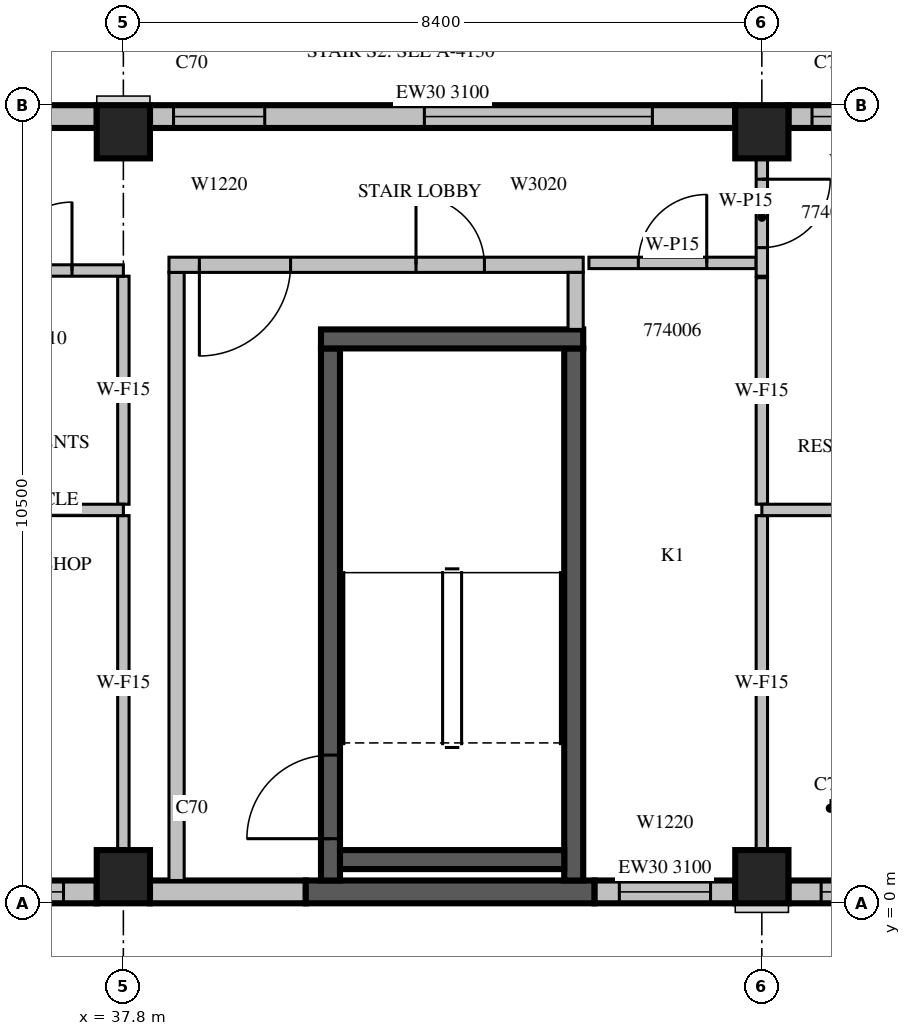
"""IFC4 building model, lengths in metres.
Left out: names, types, materials, properties, quantities, classifications, styles, units other than length and angle.
Written with IfcOpenShell. Run it as: python <this file> out.ifc"""

import sys

from ifc_helpers import new_model, si_unit, direction, frame, frame_2d, origin, origin_2d, place, context, subcontext, project, spatial, rectangle, extrude, source, transform, mapped, element, fill, save


model = new_model("IFC4")
c1 = context("Model", 3, precision=1e-05, world=origin(), true_north=direction((0.0, 1.0)))
c2 = subcontext(c1, "Body", "Model", "MODEL_VIEW")
j1 = project(units=[si_unit("LENGTHUNIT", "METRE"), si_unit("PLANEANGLEUNIT", "RADIAN")], contexts=[c1])
p1 = place(None, origin())
s1 = spatial("IfcSite", under=j1, at=p1, CompositionType="ELEMENT")
p2 = place(p1, origin())
s2 = spatial("IfcBuilding", under=s1, at=p2, CompositionType="ELEMENT")
p3 = place(p2, frame((0.0, 0.0, 319.5)))
s3 = spatial("IfcBuildingStorey", under=s2, at=p3, CompositionType="ELEMENT", Elevation=319.5)
m1 = source(origin(), c2, "Body", "SweptSolid", [
    extrude(rectangle(XDim=0.7, YDim=0.7, at=origin_2d()), origin(), (0.0, 0.0, 1.0), 3.5),
])
for number, where, z_axis, x_axis in (
    (1, (37.8, 0.35, 0.0), (0.0, 0.0, 1.0), (1.0, 0.0, 0.0)),
    (2, (46.2, 0.35, 0.0), (0.0, 0.0, 1.0), (1.0, 0.0, 0.0)),
    (3, (37.8, 10.15, 0.0), (0.0, 0.0, 1.0), (1.0, 0.0, 0.0)),
    (4, (46.2, 10.15, 0.0), (0.0, 0.0, 1.0), (1.0, 0.0, 0.0)),
):
    element("IfcColumn", number, at=place(p3, frame(where, z_axis=z_axis, x_axis=x_axis)), inside=s3, PredefinedType="COLUMN", context=c2, shape_type="MappedRepresentation", body=[
        mapped(m1, transform((0.0, 0.0, 0.0), scale=1.0)),
    ])
m2 = source(origin(), c2, "Body", "SweptSolid", [
    extrude(rectangle(XDim=7.7, YDim=0.3, at=frame_2d((3.85, 0.0))), origin(), (0.0, 0.0, 1.0), 3.1),
])
p4 = place(p3, frame((29.75, 0.15, 0.0), z_axis=(0.0, 0.0, 1.0), x_axis=(1.0, 0.0, 0.0)))
e5 = element("IfcWall", 5, at=p4, inside=s3, PredefinedType="STANDARD", context=c2, shape_type="MappedRepresentation", body=[
    mapped(m2, transform((0.0, 0.0, 0.0), scale=1.0)),
])
m3 = source(origin(), c2, "Body", "SweptSolid", [
    extrude(rectangle(XDim=1.2, YDim=2.0, at=frame_2d((0.6, 1.0))), frame((0.0, 0.16, 0.0), z_axis=(0.0, -1.0, 0.0), x_axis=(1.0, 0.0, 0.0)), (0.0, 0.0, 1.0), 0.32),
])
p5 = place(p4, frame((0.537, 0.0, 0.6)))
e6 = element("IfcOpeningElement", 6, at=p5, cuts=e5, PredefinedType="OPENING", context=c2, shape_type="MappedRepresentation", body=[
    mapped(m3, transform((0.0, 0.0, 0.0), scale=1.0)),
])
p6 = place(p4, frame((6.062, 0.0, 0.6)))
e7 = element("IfcOpeningElement", 7, at=p6, cuts=e5, PredefinedType="OPENING", context=c2, shape_type="MappedRepresentation", body=[
    mapped(m3, transform((0.0, 0.0, 0.0), scale=1.0)),
])
m4 = source(origin(), c2, "Body", "SweptSolid", [
    extrude(rectangle(XDim=2.4, YDim=2.0, at=frame_2d((1.2, 1.0))), frame((0.0, 0.16, 0.0), z_axis=(0.0, -1.0, 0.0), x_axis=(1.0, 0.0, 0.0)), (0.0, 0.0, 1.0), 0.32),
])
p7 = place(p4, frame((2.7, 0.0, 0.6)))
e8 = element("IfcOpeningElement", 8, at=p7, cuts=e5, PredefinedType="OPENING", context=c2, shape_type="MappedRepresentation", body=[
    mapped(m4, transform((0.0, 0.0, 0.0), scale=1.0)),
])
m5 = source(origin(), c2, "Body", "SweptSolid", [
    extrude(rectangle(XDim=2.05, YDim=0.3, at=frame_2d((1.025, 0.0))), origin(), (0.0, 0.0, 1.0), 3.1),
])
p8 = place(p3, frame((38.15, 0.15, 0.0), z_axis=(0.0, 0.0, 1.0), x_axis=(1.0, 0.0, 0.0)))
e9 = element("IfcWall", 9, at=p8, inside=s3, PredefinedType="STANDARD", context=c2, shape_type="MappedRepresentation", body=[
    mapped(m5, transform((0.0, 0.0, 0.0), scale=1.0)),
])
m6 = source(origin(), c2, "Body", "SweptSolid", [
    extrude(rectangle(XDim=3.8, YDim=0.3, at=frame_2d((1.9, 0.0))), origin(), (0.0, 0.0, 1.0), 3.1),
])
p9 = place(p3, frame((40.2, 0.15, 0.0), z_axis=(0.0, 0.0, 1.0), x_axis=(1.0, 0.0, 0.0)))
e10 = element("IfcWall", 10, at=p9, inside=s3, PredefinedType="SOLIDWALL", context=c2, shape_type="MappedRepresentation", body=[
    mapped(m6, transform((0.0, 0.0, 0.0), scale=1.0)),
])
m7 = source(origin(), c2, "Body", "SweptSolid", [
    extrude(rectangle(XDim=1.85, YDim=0.3, at=frame_2d((0.925, 0.0))), origin(), (0.0, 0.0, 1.0), 3.1),
])
p10 = place(p3, frame((44.0, 0.15, 0.0), z_axis=(0.0, 0.0, 1.0), x_axis=(1.0, 0.0, 0.0)))
e11 = element("IfcWall", 11, at=p10, inside=s3, PredefinedType="STANDARD", context=c2, shape_type="MappedRepresentation", body=[
    mapped(m7, transform((0.0, 0.0, 0.0), scale=1.0)),
])
p11 = place(p10, frame((0.325, 0.0, 0.6)))
e12 = element("IfcOpeningElement", 12, at=p11, cuts=e11, PredefinedType="OPENING", context=c2, shape_type="MappedRepresentation", body=[
    mapped(m3, transform((0.0, 0.0, 0.0), scale=1.0)),
])
m8 = source(origin(), c2, "Body", "SweptSolid", [
    extrude(rectangle(XDim=3.01, YDim=0.3, at=frame_2d((1.505, 0.0))), origin(), (0.0, 0.0, 1.0), 3.1),
])
p12 = place(p3, frame((46.55, 0.15, 0.0), z_axis=(0.0, 0.0, 1.0), x_axis=(1.0, 0.0, 0.0)))
e13 = element("IfcWall", 13, at=p12, inside=s3, PredefinedType="STANDARD", context=c2, shape_type="MappedRepresentation", body=[
    mapped(m8, transform((0.0, 0.0, 0.0), scale=1.0)),
])
m9 = source(origin(), c2, "Body", "SweptSolid", [
    extrude(rectangle(XDim=1.8, YDim=2.0, at=frame_2d((0.9, 1.0))), frame((0.0, 0.16, 0.0), z_axis=(0.0, -1.0, 0.0), x_axis=(1.0, 0.0, 0.0)), (0.0, 0.0, 1.0), 0.32),
])
p13 = place(p12, frame((0.43, 0.0, 0.6)))
e14 = element("IfcOpeningElement", 14, at=p13, cuts=e13, PredefinedType="OPENING", context=c2, shape_type="MappedRepresentation", body=[
    mapped(m9, transform((0.0, 0.0, 0.0), scale=1.0)),
])
p14 = place(p3, frame((49.56, 10.35, 0.0), z_axis=(0.0, 0.0, 1.0), x_axis=(-1.0, 0.0, 0.0)))
e15 = element("IfcWall", 15, at=p14, inside=s3, PredefinedType="STANDARD", context=c2, shape_type="MappedRepresentation", body=[
    mapped(m8, transform((0.0, 0.0, 0.0), scale=1.0)),
])
p15 = place(p14, frame((1.5, 0.0, 0.6)))
e16 = element("IfcOpeningElement", 16, at=p15, cuts=e15, PredefinedType="OPENING", context=c2, shape_type="MappedRepresentation", body=[
    mapped(m3, transform((0.0, 0.0, 0.0), scale=1.0)),
])
p16 = place(p3, frame((45.85, 10.35, 0.0), z_axis=(0.0, 0.0, 1.0), x_axis=(-1.0, 0.0, 0.0)))
e17 = element("IfcWall", 17, at=p16, inside=s3, PredefinedType="STANDARD", context=c2, shape_type="MappedRepresentation", body=[
    mapped(m2, transform((0.0, 0.0, 0.0), scale=1.0)),
])
m10 = source(origin(), c2, "Body", "SweptSolid", [
    extrude(rectangle(XDim=3.0, YDim=2.0, at=frame_2d((1.5, 1.0))), frame((0.0, 0.16, 0.0), z_axis=(0.0, -1.0, 0.0), x_axis=(1.0, 0.0, 0.0)), (0.0, 0.0, 1.0), 0.32),
])
p17 = place(p16, frame((1.09, 0.0, 0.6)))
e18 = element("IfcOpeningElement", 18, at=p17, cuts=e17, PredefinedType="OPENING", context=c2, shape_type="MappedRepresentation", body=[
    mapped(m10, transform((0.0, 0.0, 0.0), scale=1.0)),
])
p18 = place(p16, frame((6.19, 0.0, 0.6)))
e19 = element("IfcOpeningElement", 19, at=p18, cuts=e17, PredefinedType="OPENING", context=c2, shape_type="MappedRepresentation", body=[
    mapped(m3, transform((0.0, 0.0, 0.0), scale=1.0)),
])
p19 = place(p3, frame((37.45, 10.35, 0.0), z_axis=(0.0, 0.0, 1.0), x_axis=(-1.0, 0.0, 0.0)))
e20 = element("IfcWall", 20, at=p19, inside=s3, PredefinedType="STANDARD", context=c2, shape_type="MappedRepresentation", body=[
    mapped(m2, transform((0.0, 0.0, 0.0), scale=1.0)),
])
p20 = place(p19, frame((1.09, 0.0, 0.6)))
e21 = element("IfcOpeningElement", 21, at=p20, cuts=e20, PredefinedType="OPENING", context=c2, shape_type="MappedRepresentation", body=[
    mapped(m10, transform((0.0, 0.0, 0.0), scale=1.0)),
])
p21 = place(p19, frame((6.19, 0.0, 0.6)))
e22 = element("IfcOpeningElement", 22, at=p21, cuts=e20, PredefinedType="OPENING", context=c2, shape_type="MappedRepresentation", body=[
    mapped(m3, transform((0.0, 0.0, 0.0), scale=1.0)),
])
m11 = source(origin(), c2, "Body", "SweptSolid", [
    extrude(rectangle(XDim=7.0, YDim=0.25, at=frame_2d((3.5, 0.0))), origin(), (0.0, 0.0, 1.0), 3.1),
])
p22 = place(p3, frame((40.525, 0.3, 0.0), z_axis=(0.0, 0.0, 1.0), x_axis=(0.0, 1.0, 0.0)))
e23 = element("IfcWall", 23, at=p22, inside=s3, PredefinedType="SOLIDWALL", context=c2, shape_type="MappedRepresentation", body=[
    mapped(m11, transform((0.0, 0.0, 0.0), scale=1.0)),
])
m12 = source(origin(), c2, "Body", "SweptSolid", [
    extrude(rectangle(XDim=1.1, YDim=2.1, at=frame_2d((0.55, 1.05))), frame((0.0, 0.135, 0.0), z_axis=(0.0, -1.0, 0.0), x_axis=(1.0, 0.0, 0.0)), (0.0, 0.0, 1.0), 0.27),
])
p23 = place(p22, frame((0.55, 0.0, 0.0)))
e24 = element("IfcOpeningElement", 24, at=p23, cuts=e23, PredefinedType="OPENING", context=c2, shape_type="MappedRepresentation", body=[
    mapped(m12, transform((0.0, 0.0, 0.0), scale=1.0)),
])
p24 = place(p3, frame((43.725, 0.3, 0.0), z_axis=(0.0, 0.0, 1.0), x_axis=(0.0, 1.0, 0.0)))
e25 = element("IfcWall", 25, at=p24, inside=s3, PredefinedType="SOLIDWALL", context=c2, shape_type="MappedRepresentation", body=[
    mapped(m11, transform((0.0, 0.0, 0.0), scale=1.0)),
])
m13 = source(origin(), c2, "Body", "SweptSolid", [
    extrude(rectangle(XDim=3.45, YDim=0.25, at=frame_2d((1.725, 0.0))), origin(), (0.0, 0.0, 1.0), 3.1),
])
p25 = place(p3, frame((40.4, 7.425, 0.0), z_axis=(0.0, 0.0, 1.0), x_axis=(1.0, 0.0, 0.0)))
e26 = element("IfcWall", 26, at=p25, inside=s3, PredefinedType="SOLIDWALL", context=c2, shape_type="MappedRepresentation", body=[
    mapped(m13, transform((0.0, 0.0, 0.0), scale=1.0)),
])
m14 = source(origin(), c2, "Body", "SweptSolid", [
    extrude(rectangle(XDim=2.95, YDim=0.25, at=frame_2d((1.475, 0.0))), origin(), (0.0, 0.0, 1.0), 3.1),
])
p26 = place(p3, frame((40.65, 0.575, 0.0), z_axis=(0.0, 0.0, 1.0), x_axis=(1.0, 0.0, 0.0)))
e27 = element("IfcWall", 27, at=p26, inside=s3, PredefinedType="SOLIDWALL", context=c2, shape_type="MappedRepresentation", body=[
    mapped(m14, transform((0.0, 0.0, 0.0), scale=1.0)),
])
m15 = source(origin(), c2, "Body", "SweptSolid", [
    extrude(rectangle(XDim=8.0, YDim=0.2, at=frame_2d((4.0, 0.0))), origin(), (0.0, 0.0, 1.0), 3.1),
])
p27 = place(p3, frame((38.5, 0.3, 0.0), z_axis=(0.0, 0.0, 1.0), x_axis=(0.0, 1.0, 0.0)))
e28 = element("IfcWall", 28, at=p27, inside=s3, PredefinedType="PARTITIONING", context=c2, shape_type="MappedRepresentation", body=[
    mapped(m15, transform((0.0, 0.0, 0.0), scale=1.0)),
])
m16 = source(origin(), c2, "Body", "SweptSolid", [
    extrude(rectangle(XDim=5.45, YDim=0.2, at=frame_2d((2.725, 0.0))), origin(), (0.0, 0.0, 1.0), 3.1),
])
p28 = place(p3, frame((38.4, 8.4, 0.0), z_axis=(0.0, 0.0, 1.0), x_axis=(1.0, 0.0, 0.0)))
e29 = element("IfcWall", 29, at=p28, inside=s3, PredefinedType="PARTITIONING", context=c2, shape_type="MappedRepresentation", body=[
    mapped(m16, transform((0.0, 0.0, 0.0), scale=1.0)),
])
m17 = source(origin(), c2, "Body", "SweptSolid", [
    extrude(rectangle(XDim=1.2, YDim=2.1, at=frame_2d((0.6, 1.05))), frame((0.0, 0.11, 0.0), z_axis=(0.0, -1.0, 0.0), x_axis=(1.0, 0.0, 0.0)), (0.0, 0.0, 1.0), 0.22),
])
p29 = place(p28, frame((0.4, 0.0, 0.0)))
e30 = element("IfcOpeningElement", 30, at=p29, cuts=e29, PredefinedType="OPENING", context=c2, shape_type="MappedRepresentation", body=[
    mapped(m17, transform((0.0, 0.0, 0.0), scale=1.0)),
])
m18 = source(origin(), c2, "Body", "SweptSolid", [
    extrude(rectangle(XDim=0.9, YDim=2.1, at=frame_2d((0.45, 1.05))), frame((0.0, 0.11, 0.0), z_axis=(0.0, -1.0, 0.0), x_axis=(1.0, 0.0, 0.0)), (0.0, 0.0, 1.0), 0.22),
])
p30 = place(p28, frame((3.25, 0.0, 0.0)))
e31 = element("IfcOpeningElement", 31, at=p30, cuts=e29, PredefinedType="OPENING", context=c2, shape_type="MappedRepresentation", body=[
    mapped(m18, transform((0.0, 0.0, 0.0), scale=1.0)),
])
m19 = source(origin(), c2, "Body", "SweptSolid", [
    extrude(rectangle(XDim=0.75, YDim=0.2, at=frame_2d((0.375, 0.0))), origin(), (0.0, 0.0, 1.0), 3.1),
])
p31 = place(p3, frame((43.75, 7.55, 0.0), z_axis=(0.0, 0.0, 1.0), x_axis=(0.0, 1.0, 0.0)))
e32 = element("IfcWall", 32, at=p31, inside=s3, PredefinedType="PARTITIONING", context=c2, shape_type="MappedRepresentation", body=[
    mapped(m19, transform((0.0, 0.0, 0.0), scale=1.0)),
])
m20 = source(origin(), c2, "Body", "SweptSolid", [
    extrude(rectangle(XDim=2.2, YDim=0.15, at=frame_2d((1.1, 0.0))), origin(), (0.0, 0.0, 1.0), 3.1),
])
p32 = place(p3, frame((46.125, 8.425, 0.0), z_axis=(0.0, 0.0, 1.0), x_axis=(-1.0, 0.0, 0.0)))
e33 = element("IfcWall", 33, at=p32, inside=s3, PredefinedType="PARTITIONING", context=c2, shape_type="MappedRepresentation", body=[
    mapped(m20, transform((0.0, 0.0, 0.0), scale=1.0)),
])
m21 = source(origin(), c2, "Body", "SweptSolid", [
    extrude(rectangle(XDim=0.9, YDim=2.1, at=frame_2d((0.45, 1.05))), frame((0.0, 0.085, 0.0), z_axis=(0.0, -1.0, 0.0), x_axis=(1.0, 0.0, 0.0)), (0.0, 0.0, 1.0), 0.17),
])
p33 = place(p32, frame((0.65, 0.0, 0.0)))
e34 = element("IfcOpeningElement", 34, at=p33, cuts=e33, PredefinedType="OPENING", context=c2, shape_type="MappedRepresentation", body=[
    mapped(m21, transform((0.0, 0.0, 0.0), scale=1.0)),
])
m22 = source(origin(), c2, "Body", "SweptSolid", [
    extrude(rectangle(XDim=4.401, YDim=0.15, at=frame_2d((2.2, 0.0))), origin(), (0.0, 0.0, 1.0), 3.1),
])
p34 = place(p3, frame((37.8, 0.699, 0.0), z_axis=(0.0, 0.0, 1.0), x_axis=(0.0, 1.0, 0.0)))
e35 = element("IfcWall", 35, at=p34, inside=s3, PredefinedType="PARTITIONING", context=c2, shape_type="MappedRepresentation", body=[
    mapped(m22, transform((0.0, 0.0, 0.0), scale=1.0)),
])
m23 = source(origin(), c2, "Body", "SweptSolid", [
    extrude(rectangle(XDim=3.0, YDim=0.15, at=frame_2d((1.5, 0.0))), origin(), (0.0, 0.0, 1.0), 3.1),
])
p35 = place(p3, frame((37.8, 5.25, 0.0), z_axis=(0.0, 0.0, 1.0), x_axis=(0.0, 1.0, 0.0)))
e36 = element("IfcWall", 36, at=p35, inside=s3, PredefinedType="PARTITIONING", context=c2, shape_type="MappedRepresentation", body=[
    mapped(m23, transform((0.0, 0.0, 0.0), scale=1.0)),
])
m24 = source(origin(), c2, "Body", "SweptSolid", [
    extrude(rectangle(XDim=8.4, YDim=0.15, at=frame_2d((4.2, 0.0))), origin(), (0.0, 0.0, 1.0), 3.1),
])
p36 = place(p3, frame((37.8, 5.175, 0.0), z_axis=(0.0, 0.0, 1.0), x_axis=(-1.0, 0.0, 0.0)))
e37 = element("IfcWall", 37, at=p36, inside=s3, PredefinedType="PARTITIONING", context=c2, shape_type="MappedRepresentation", body=[
    mapped(m24, transform((0.0, 0.0, 0.0), scale=1.0)),
])
m25 = source(origin(), c2, "Body", "SweptSolid", [
    extrude(rectangle(XDim=1.2, YDim=2.1, at=frame_2d((0.6, 1.05))), frame((0.0, 0.085, 0.0), z_axis=(0.0, -1.0, 0.0), x_axis=(1.0, 0.0, 0.0)), (0.0, 0.0, 1.0), 0.17),
])
p37 = place(p36, frame((5.648, 0.0, 0.0)))
e38 = element("IfcOpeningElement", 38, at=p37, cuts=e37, PredefinedType="OPENING", context=c2, shape_type="MappedRepresentation", body=[
    mapped(m25, transform((0.0, 0.0, 0.0), scale=1.0)),
])
m26 = source(origin(), c2, "Body", "SweptSolid", [
    extrude(rectangle(XDim=1.551, YDim=0.15, at=frame_2d((0.775, 0.0))), origin(), (0.0, 0.0, 1.0), 3.1),
])
p38 = place(p3, frame((46.2, 9.801, 0.0), z_axis=(0.0, 0.0, 1.0), x_axis=(0.0, -1.0, 0.0)))
e39 = element("IfcWall", 39, at=p38, inside=s3, PredefinedType="PARTITIONING", context=c2, shape_type="MappedRepresentation", body=[
    mapped(m26, transform((0.0, 0.0, 0.0), scale=1.0)),
])
p39 = place(p38, frame((0.275, 0.0, 0.0)))
e40 = element("IfcOpeningElement", 40, at=p39, cuts=e39, PredefinedType="OPENING", context=c2, shape_type="MappedRepresentation", body=[
    mapped(m21, transform((0.0, 0.0, 0.0), scale=1.0)),
])
p40 = place(p3, frame((46.2, 0.699, 0.0), z_axis=(0.0, 0.0, 1.0), x_axis=(0.0, 1.0, 0.0)))
e41 = element("IfcWall", 41, at=p40, inside=s3, PredefinedType="PARTITIONING", context=c2, shape_type="MappedRepresentation", body=[
    mapped(m22, transform((0.0, 0.0, 0.0), scale=1.0)),
])
m27 = source(origin(), c2, "Body", "SweptSolid", [
    extrude(rectangle(XDim=2.98, YDim=0.15, at=frame_2d((1.49, 0.0))), origin(), (0.0, 0.0, 1.0), 3.1),
])
p41 = place(p3, frame((46.2, 5.25, 0.0), z_axis=(0.0, 0.0, 1.0), x_axis=(0.0, 1.0, 0.0)))
e42 = element("IfcWall", 42, at=p41, inside=s3, PredefinedType="PARTITIONING", context=c2, shape_type="MappedRepresentation", body=[
    mapped(m27, transform((0.0, 0.0, 0.0), scale=1.0)),
])
m28 = source(origin(), c2, "Body", "SweptSolid", [
    extrude(rectangle(XDim=3.06, YDim=0.15, at=frame_2d((1.53, 0.0))), origin(), (0.0, 0.0, 1.0), 3.1),
])
p42 = place(p3, frame((49.26, 5.175, 0.0), z_axis=(0.0, 0.0, 1.0), x_axis=(-1.0, 0.0, 0.0)))
e43 = element("IfcWall", 43, at=p42, inside=s3, PredefinedType="PARTITIONING", context=c2, shape_type="MappedRepresentation", body=[
    mapped(m28, transform((0.0, 0.0, 0.0), scale=1.0)),
])
p43 = place(p3, frame((37.8, 8.325, 0.0), z_axis=(0.0, 0.0, 1.0), x_axis=(-1.0, 0.0, 0.0)))
e44 = element("IfcWall", 44, at=p43, inside=s3, PredefinedType="PARTITIONING", context=c2, shape_type="MappedRepresentation", body=[
    mapped(m24, transform((0.0, 0.0, 0.0), scale=1.0)),
])
p44 = place(p43, frame((5.698, 0.0, 0.0)))
e45 = element("IfcOpeningElement", 45, at=p44, cuts=e44, PredefinedType="OPENING", context=c2, shape_type="MappedRepresentation", body=[
    mapped(m25, transform((0.0, 0.0, 0.0), scale=1.0)),
])
p45 = place(p43, frame((2.773, 0.0, 0.0)))
e46 = element("IfcOpeningElement", 46, at=p45, cuts=e44, PredefinedType="OPENING", context=c2, shape_type="MappedRepresentation", body=[
    mapped(m21, transform((0.0, 0.0, 0.0), scale=1.0)),
])
p46 = place(p43, frame((0.676, 0.0, 0.0)))
e47 = element("IfcOpeningElement", 47, at=p46, cuts=e44, PredefinedType="OPENING", context=c2, shape_type="MappedRepresentation", body=[
    mapped(m21, transform((0.0, 0.0, 0.0), scale=1.0)),
])
m29 = source(origin(), c2, "Body", "SweptSolid", [
    extrude(rectangle(XDim=1.2, YDim=2.0, at=frame_2d((0.6, 1.0))), frame((0.0, 0.03, 0.0), z_axis=(0.0, -1.0, 0.0), x_axis=(1.0, 0.0, 0.0)), (0.0, 0.0, 1.0), 0.06),
])
p47 = place(p6, origin())
e48 = element("IfcWindow", 48, at=p47, inside=s3, PartitioningType="SINGLE_PANEL", PredefinedType="WINDOW", context=c2, shape_type="MappedRepresentation", body=[
    mapped(m29, transform((0.0, 0.0, 0.0), scale=1.0)),
])
fill(e7, e48)
p48 = place(p11, origin())
e49 = element("IfcWindow", 49, at=p48, inside=s3, PartitioningType="SINGLE_PANEL", PredefinedType="WINDOW", context=c2, shape_type="MappedRepresentation", body=[
    mapped(m29, transform((0.0, 0.0, 0.0), scale=1.0)),
])
fill(e12, e49)
m30 = source(origin(), c2, "Body", "SweptSolid", [
    extrude(rectangle(XDim=1.8, YDim=2.0, at=frame_2d((0.9, 1.0))), frame((0.0, 0.03, 0.0), z_axis=(0.0, -1.0, 0.0), x_axis=(1.0, 0.0, 0.0)), (0.0, 0.0, 1.0), 0.06),
])
p49 = place(p13, origin())
e50 = element("IfcWindow", 50, at=p49, inside=s3, PartitioningType="SINGLE_PANEL", PredefinedType="WINDOW", context=c2, shape_type="MappedRepresentation", body=[
    mapped(m30, transform((0.0, 0.0, 0.0), scale=1.0)),
])
fill(e14, e50)
p50 = place(p15, origin())
e51 = element("IfcWindow", 51, at=p50, inside=s3, PartitioningType="SINGLE_PANEL", PredefinedType="WINDOW", context=c2, shape_type="MappedRepresentation", body=[
    mapped(m29, transform((0.0, 0.0, 0.0), scale=1.0)),
])
fill(e16, e51)
m31 = source(origin(), c2, "Body", "SweptSolid", [
    extrude(rectangle(XDim=3.0, YDim=2.0, at=frame_2d((1.5, 1.0))), frame((0.0, 0.03, 0.0), z_axis=(0.0, -1.0, 0.0), x_axis=(1.0, 0.0, 0.0)), (0.0, 0.0, 1.0), 0.06),
])
p51 = place(p17, origin())
e52 = element("IfcWindow", 52, at=p51, inside=s3, PartitioningType="SINGLE_PANEL", PredefinedType="WINDOW", context=c2, shape_type="MappedRepresentation", body=[
    mapped(m31, transform((0.0, 0.0, 0.0), scale=1.0)),
])
fill(e18, e52)
p52 = place(p18, origin())
e53 = element("IfcWindow", 53, at=p52, inside=s3, PartitioningType="SINGLE_PANEL", PredefinedType="WINDOW", context=c2, shape_type="MappedRepresentation", body=[
    mapped(m29, transform((0.0, 0.0, 0.0), scale=1.0)),
])
fill(e19, e53)
m32 = source(origin(), c2, "Body", "SweptSolid", [
    extrude(rectangle(XDim=1.1, YDim=2.1, at=frame_2d((0.55, 1.05))), frame((0.0, 0.025, 0.0), z_axis=(0.0, -1.0, 0.0), x_axis=(1.0, 0.0, 0.0)), (0.0, 0.0, 1.0), 0.05),
])
p53 = place(p23, origin())
e54 = element("IfcDoor", 54, at=p53, inside=s3, OperationType="SINGLE_SWING_LEFT", PredefinedType="DOOR", context=c2, shape_type="MappedRepresentation", body=[
    mapped(m32, transform((0.0, 0.0, 0.0), scale=1.0)),
])
fill(e24, e54)
m33 = source(origin(), c2, "Body", "SweptSolid", [
    extrude(rectangle(XDim=1.2, YDim=2.1, at=frame_2d((0.6, 1.05))), frame((0.0, 0.025, 0.0), z_axis=(0.0, -1.0, 0.0), x_axis=(1.0, 0.0, 0.0)), (0.0, 0.0, 1.0), 0.05),
])
p54 = place(p29, origin())
e55 = element("IfcDoor", 55, at=p54, inside=s3, OperationType="SINGLE_SWING_RIGHT", PredefinedType="DOOR", context=c2, shape_type="MappedRepresentation", body=[
    mapped(m33, transform((0.0, 0.0, 0.0), scale=1.0)),
])
fill(e30, e55)
m34 = source(origin(), c2, "Body", "SweptSolid", [
    extrude(rectangle(XDim=0.9, YDim=2.1, at=frame_2d((0.45, 1.05))), frame((0.0, 0.025, 0.0), z_axis=(0.0, -1.0, 0.0), x_axis=(1.0, 0.0, 0.0)), (0.0, 0.0, 1.0), 0.05),
])
p55 = place(p30, origin())
e56 = element("IfcDoor", 56, at=p55, inside=s3, OperationType="SINGLE_SWING_LEFT", PredefinedType="DOOR", context=c2, shape_type="MappedRepresentation", body=[
    mapped(m34, transform((0.0, 0.0, 0.0), scale=1.0)),
])
fill(e31, e56)
p56 = place(p33, origin())
e57 = element("IfcDoor", 57, at=p56, inside=s3, OperationType="SINGLE_SWING_RIGHT", PredefinedType="DOOR", context=c2, shape_type="MappedRepresentation", body=[
    mapped(m34, transform((0.0, 0.0, 0.0), scale=1.0)),
])
fill(e34, e57)
p57 = place(p46, origin())
e58 = element("IfcDoor", 58, at=p57, inside=s3, OperationType="SINGLE_SWING_RIGHT", PredefinedType="DOOR", context=c2, shape_type="MappedRepresentation", body=[
    mapped(m34, transform((0.0, 0.0, 0.0), scale=1.0)),
])
fill(e47, e58)
p58 = place(p39, origin())
e59 = element("IfcDoor", 59, at=p58, inside=s3, OperationType="SINGLE_SWING_LEFT", PredefinedType="DOOR", context=c2, shape_type="MappedRepresentation", body=[
    mapped(m34, transform((0.0, 0.0, 0.0), scale=1.0)),
])
fill(e40, e59)
save(model, sys.argv[1])
